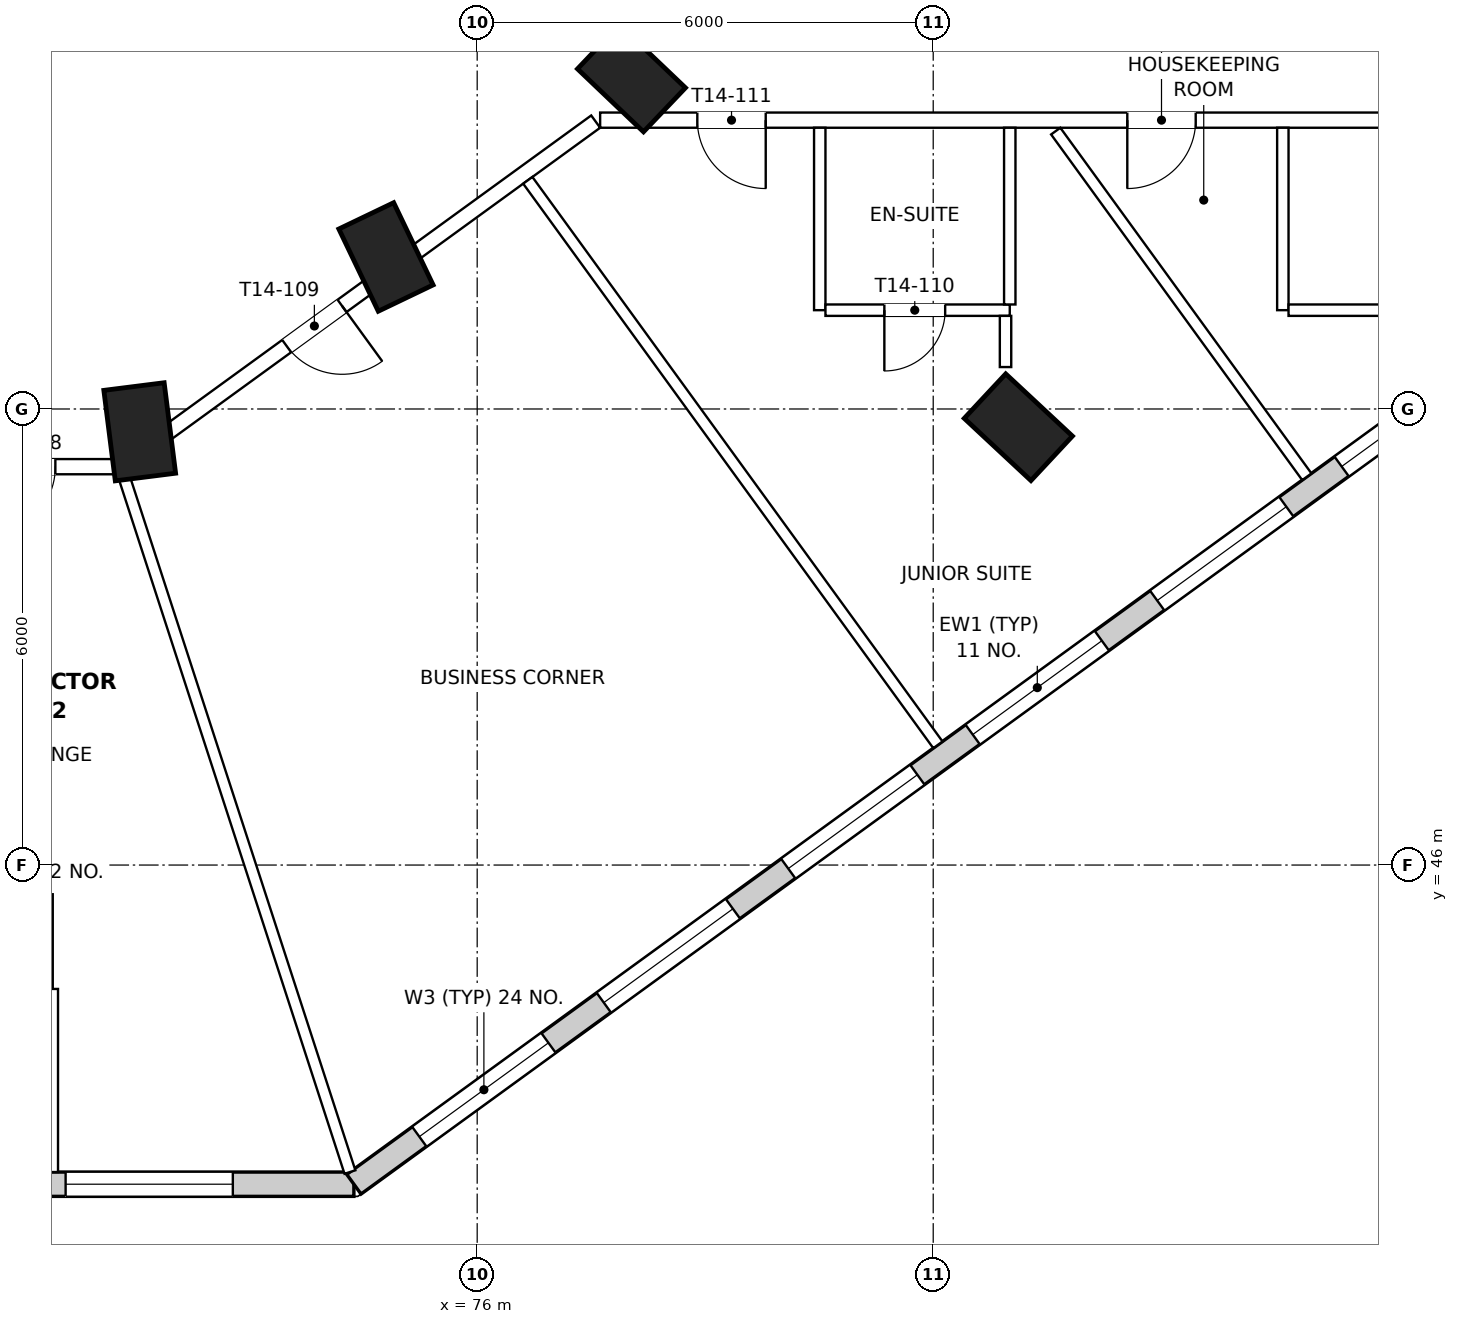
"""IFC4 building model, lengths in metres.
Left out: names, types, materials, properties, quantities, classifications, styles, units other than length and angle.
Written with IfcOpenShell. Run it as: python <this file> out.ifc"""

import sys

from ifc_helpers import new_model, si_unit, direction, frame, frame_2d, origin, origin_2d, place, context, subcontext, project, spatial, rectangle, extrude, element, fill, save


model = new_model("IFC4")
c1 = context("Model", 3, precision=1e-05, world=origin(), true_north=direction((0.0, 1.0)))
c2 = subcontext(c1, "Body", "Model", "MODEL_VIEW")
j1 = project(units=[si_unit("LENGTHUNIT", "METRE"), si_unit("PLANEANGLEUNIT", "RADIAN")], contexts=[c1])
p1 = place(None, origin())
s1 = spatial("IfcSite", under=j1, at=p1, CompositionType="ELEMENT")
p2 = place(p1, origin())
s2 = spatial("IfcBuilding", under=s1, at=p2, CompositionType="ELEMENT")
p3 = place(p2, frame((0.0, 0.0, 204.3)))
s3 = spatial("IfcBuildingStorey", under=s2, at=p3, CompositionType="ELEMENT", Elevation=204.3)
for number, where, z_axis, x_axis in (
    (1, (83.12, 51.76, 0.0), (0.0, 0.0, 1.0), (-0.682, -0.731, 0.0)),
    (2, (71.56, 51.7, 0.0), (0.0, 0.0, 1.0), (-0.992, -0.126, 0.0)),
    (3, (74.8, 54.0, 0.0), (0.0, 0.0, 1.0), (-0.902, -0.432, 0.0)),
    (4, (78.03, 56.35, 0.0), (0.0, 0.0, 1.0), (-0.69, -0.724, 0.0)),
):
    element("IfcColumn", number, at=place(p3, frame(where, z_axis=z_axis, x_axis=x_axis)), inside=s3, PredefinedType="COLUMN", context=c2, shape_type="SweptSolid", body=[
        extrude(rectangle(XDim=0.8, YDim=1.2, at=origin_2d()), origin(), (0.0, 0.0, 1.0), 3.9),
    ])
p4 = place(p3, frame((65.622, 41.801, 0.0), z_axis=(0.0, 0.0, 1.0), x_axis=(1.0, 0.0, 0.0)))
e5 = element("IfcWall", 5, at=p4, inside=s3, PredefinedType="SOLIDWALL", context=c2, shape_type="SweptSolid", body=[
    extrude(rectangle(XDim=8.755, YDim=0.32, at=frame_2d((4.378, 0.0))), origin(), (0.0, 0.0, 1.0), 3.6),
])
p5 = place(p4, frame((1.778, 0.0, 0.75)))
e6 = element("IfcOpeningElement", 6, at=p5, cuts=e5, PredefinedType="OPENING", context=c2, shape_type="SweptSolid", body=[
    extrude(rectangle(XDim=2.2, YDim=2.1, at=frame_2d((1.1, 1.05))), frame((0.0, 0.17, 0.0), z_axis=(0.0, -1.0, 0.0), x_axis=(1.0, 0.0, 0.0)), (0.0, 0.0, 1.0), 0.34),
])
p6 = place(p4, frame((4.963, 0.0, 0.75)))
e7 = element("IfcOpeningElement", 7, at=p6, cuts=e5, PredefinedType="OPENING", context=c2, shape_type="SweptSolid", body=[
    extrude(rectangle(XDim=2.2, YDim=2.1, at=frame_2d((1.1, 1.05))), frame((0.0, 0.17, 0.0), z_axis=(0.0, -1.0, 0.0), x_axis=(1.0, 0.0, 0.0)), (0.0, 0.0, 1.0), 0.34),
])
p7 = place(p3, frame((74.378, 41.801, 0.0), z_axis=(0.0, 0.0, 1.0), x_axis=(0.809017634756, 0.587784370883, 0.0)))
e8 = element("IfcWall", 8, at=p7, inside=s3, PredefinedType="SOLIDWALL", context=c2, shape_type="SweptSolid", body=[
    extrude(rectangle(XDim=22.229, YDim=0.32, at=frame_2d((11.114, 0.0))), origin(), (0.0, 0.0, 1.0), 3.6),
])
p8 = place(p7, frame((1.064, 0.0, 0.75)))
e9 = element("IfcOpeningElement", 9, at=p8, cuts=e8, PredefinedType="OPENING", context=c2, shape_type="SweptSolid", body=[
    extrude(rectangle(XDim=2.1, YDim=2.1, at=frame_2d((1.05, 1.05))), frame((0.0, 0.17, 0.0), z_axis=(0.0, -1.0, 0.0), x_axis=(1.0, 0.0, 0.0)), (0.0, 0.0, 1.0), 0.34),
])
p9 = place(p7, frame((4.064, 0.0, 0.75)))
e10 = element("IfcOpeningElement", 10, at=p9, cuts=e8, PredefinedType="OPENING", context=c2, shape_type="SweptSolid", body=[
    extrude(rectangle(XDim=2.1, YDim=2.1, at=frame_2d((1.05, 1.05))), frame((0.0, 0.17, 0.0), z_axis=(0.0, -1.0, 0.0), x_axis=(1.0, 0.0, 0.0)), (0.0, 0.0, 1.0), 0.34),
])
p10 = place(p7, frame((7.064, 0.0, 0.75)))
e11 = element("IfcOpeningElement", 11, at=p10, cuts=e8, PredefinedType="OPENING", context=c2, shape_type="SweptSolid", body=[
    extrude(rectangle(XDim=2.1, YDim=2.1, at=frame_2d((1.05, 1.05))), frame((0.0, 0.17, 0.0), z_axis=(0.0, -1.0, 0.0), x_axis=(1.0, 0.0, 0.0)), (0.0, 0.0, 1.0), 0.34),
])
p11 = place(p7, frame((10.064, 0.0, 0.75)))
e12 = element("IfcOpeningElement", 12, at=p11, cuts=e8, PredefinedType="OPENING", context=c2, shape_type="SweptSolid", body=[
    extrude(rectangle(XDim=2.1, YDim=2.1, at=frame_2d((1.05, 1.05))), frame((0.0, 0.17, 0.0), z_axis=(0.0, -1.0, 0.0), x_axis=(1.0, 0.0, 0.0)), (0.0, 0.0, 1.0), 0.34),
])
p12 = place(p7, frame((13.064, 0.0, 0.75)))
e13 = element("IfcOpeningElement", 13, at=p12, cuts=e8, PredefinedType="OPENING", context=c2, shape_type="SweptSolid", body=[
    extrude(rectangle(XDim=2.1, YDim=2.1, at=frame_2d((1.05, 1.05))), frame((0.0, 0.17, 0.0), z_axis=(0.0, -1.0, 0.0), x_axis=(1.0, 0.0, 0.0)), (0.0, 0.0, 1.0), 0.34),
])
p13 = place(p7, frame((16.064, 0.0, 0.75)))
e14 = element("IfcOpeningElement", 14, at=p13, cuts=e8, PredefinedType="OPENING", context=c2, shape_type="SweptSolid", body=[
    extrude(rectangle(XDim=2.1, YDim=2.1, at=frame_2d((1.05, 1.05))), frame((0.0, 0.17, 0.0), z_axis=(0.0, -1.0, 0.0), x_axis=(1.0, 0.0, 0.0)), (0.0, 0.0, 1.0), 0.34),
])
p14 = place(p7, frame((19.064, 0.0, 0.75)))
e15 = element("IfcOpeningElement", 15, at=p14, cuts=e8, PredefinedType="OPENING", context=c2, shape_type="SweptSolid", body=[
    extrude(rectangle(XDim=2.1, YDim=2.1, at=frame_2d((1.05, 1.05))), frame((0.0, 0.17, 0.0), z_axis=(0.0, -1.0, 0.0), x_axis=(1.0, 0.0, 0.0)), (0.0, 0.0, 1.0), 0.34),
])
p15 = place(p3, frame((89.0, 55.8, 0.0), z_axis=(0.0, 0.0, 1.0), x_axis=(-1.0, 0.0, 0.0)))
e16 = element("IfcWall", 16, at=p15, inside=s3, PredefinedType="PARTITIONING", context=c2, shape_type="SweptSolid", body=[
    extrude(rectangle(XDim=11.382, YDim=0.2, at=frame_2d((5.691, 0.0))), origin(), (0.0, 0.0, 1.0), 2.9),
])
p16 = place(p15, frame((9.204, 0.0, 0.0)))
e17 = element("IfcOpeningElement", 17, at=p16, cuts=e16, PredefinedType="OPENING", context=c2, shape_type="SweptSolid", body=[
    extrude(rectangle(XDim=0.9, YDim=2.1, at=frame_2d((0.45, 1.05))), frame((0.0, 0.11, 0.0), z_axis=(0.0, -1.0, 0.0), x_axis=(1.0, 0.0, 0.0)), (0.0, 0.0, 1.0), 0.22),
])
p17 = place(p15, frame((3.546, 0.0, 0.0)))
e18 = element("IfcOpeningElement", 18, at=p17, cuts=e16, PredefinedType="OPENING", context=c2, shape_type="SweptSolid", body=[
    extrude(rectangle(XDim=0.9, YDim=2.1, at=frame_2d((0.45, 1.05))), frame((0.0, 0.11, 0.0), z_axis=(0.0, -1.0, 0.0), x_axis=(1.0, 0.0, 0.0)), (0.0, 0.0, 1.0), 0.22),
])
p18 = place(p3, frame((77.559, 55.781, 0.0), z_axis=(0.0, 0.0, 1.0), x_axis=(-0.80901190539, -0.587792256616, 0.0)))
e19 = element("IfcWall", 19, at=p18, inside=s3, PredefinedType="PARTITIONING", context=c2, shape_type="SweptSolid", body=[
    extrude(rectangle(XDim=7.691, YDim=0.2, at=frame_2d((3.846, 0.0))), origin(), (0.0, 0.0, 1.0), 3.05),
])
p19 = place(p18, frame((4.125, 0.0, 0.0)))
e20 = element("IfcOpeningElement", 20, at=p19, cuts=e19, PredefinedType="OPENING", context=c2, shape_type="SweptSolid", body=[
    extrude(rectangle(XDim=0.9, YDim=2.1, at=frame_2d((0.45, 1.05))), frame((0.0, 0.11, 0.0), z_axis=(0.0, -1.0, 0.0), x_axis=(1.0, 0.0, 0.0)), (0.0, 0.0, 1.0), 0.22),
])
p20 = place(p3, frame((71.278, 51.241, 0.0), z_axis=(0.0, 0.0, 1.0), x_axis=(-1.0, 0.0, 0.0)))
e21 = element("IfcWall", 21, at=p20, inside=s3, PredefinedType="PARTITIONING", context=c2, shape_type="SweptSolid", body=[
    extrude(rectangle(XDim=2.556, YDim=0.2, at=frame_2d((1.278, 0.0))), origin(), (0.0, 0.0, 1.0), 3.6),
])
p21 = place(p20, frame((0.828, 0.0, 0.0)))
e22 = element("IfcOpeningElement", 22, at=p21, cuts=e21, PredefinedType="OPENING", context=c2, shape_type="SweptSolid", body=[
    extrude(rectangle(XDim=0.9, YDim=2.1, at=frame_2d((0.45, 1.05))), frame((0.0, 0.11, 0.0), z_axis=(0.0, -1.0, 0.0), x_axis=(1.0, 0.0, 0.0)), (0.0, 0.0, 1.0), 0.22),
])
p22 = place(p3, frame((74.326, 41.961, 0.0), z_axis=(0.0, 0.0, 1.0), x_axis=(-0.309002171774, 0.951061332322, 0.0)))
e23 = element("IfcWall", 23, at=p22, inside=s3, PredefinedType="PARTITIONING", context=c2, shape_type="SweptSolid", body=[
    extrude(rectangle(XDim=9.672, YDim=0.15, at=frame_2d((4.836, 0.0))), origin(), (0.0, 0.0, 1.0), 3.6),
])
p23 = place(p3, frame((82.062, 47.582, 0.0), z_axis=(0.0, 0.0, 1.0), x_axis=(-0.587777877013, 0.809022352778, 0.0)))
e24 = element("IfcWall", 24, at=p23, inside=s3, PredefinedType="PARTITIONING", context=c2, shape_type="SweptSolid", body=[
    extrude(rectangle(XDim=9.18, YDim=0.15, at=frame_2d((4.59, 0.0))), origin(), (0.0, 0.0, 1.0), 3.6),
])
p24 = place(p3, frame((86.916, 51.108, 0.0), z_axis=(0.0, 0.0, 1.0), x_axis=(-0.587804932614, 0.809002695419, 0.0)))
e25 = element("IfcWall", 25, at=p24, inside=s3, PredefinedType="PARTITIONING", context=c2, shape_type="SweptSolid", body=[
    extrude(rectangle(XDim=5.621, YDim=0.15, at=frame_2d((2.811, 0.0))), origin(), (0.0, 0.0, 1.0), 2.9),
])
p25 = place(p3, frame((80.507, 55.7, 0.0), z_axis=(0.0, 0.0, 1.0), x_axis=(0.0, -1.0, 0.0)))
e26 = element("IfcWall", 26, at=p25, inside=s3, PredefinedType="PARTITIONING", context=c2, shape_type="SweptSolid", body=[
    extrude(rectangle(XDim=2.4, YDim=0.15, at=frame_2d((1.2, 0.0))), origin(), (0.0, 0.0, 1.0), 3.6),
])
p26 = place(p3, frame((83.007, 53.3, 0.0), z_axis=(0.0, 0.0, 1.0), x_axis=(-1.0, 0.0, 0.0)))
e27 = element("IfcWall", 27, at=p26, inside=s3, PredefinedType="PARTITIONING", context=c2, shape_type="SweptSolid", body=[
    extrude(rectangle(XDim=2.425, YDim=0.15, at=frame_2d((1.212, 0.0))), origin(), (0.0, 0.0, 1.0), 3.15),
])
p27 = place(p26, frame((0.85, 0.0, 0.0)))
e28 = element("IfcOpeningElement", 28, at=p27, cuts=e27, PredefinedType="OPENING", context=c2, shape_type="SweptSolid", body=[
    extrude(rectangle(XDim=0.8, YDim=2.1, at=frame_2d((0.4, 1.05))), frame((0.0, 0.085, 0.0), z_axis=(0.0, -1.0, 0.0), x_axis=(1.0, 0.0, 0.0)), (0.0, 0.0, 1.0), 0.17),
])
p28 = place(p3, frame((83.007, 55.7, 0.0), z_axis=(0.0, 0.0, 1.0), x_axis=(0.0, -1.0, 0.0)))
e29 = element("IfcWall", 29, at=p28, inside=s3, PredefinedType="PARTITIONING", context=c2, shape_type="SweptSolid", body=[
    extrude(rectangle(XDim=2.325, YDim=0.15, at=frame_2d((1.163, 0.0))), origin(), (0.0, 0.0, 1.0), 3.15),
])
p29 = place(p3, frame((86.6, 55.7, 0.0), z_axis=(0.0, 0.0, 1.0), x_axis=(0.0, -1.0, 0.0)))
e30 = element("IfcWall", 30, at=p29, inside=s3, PredefinedType="PARTITIONING", context=c2, shape_type="SweptSolid", body=[
    extrude(rectangle(XDim=2.4, YDim=0.15, at=frame_2d((1.2, 0.0))), origin(), (0.0, 0.0, 1.0), 2.9),
])
p30 = place(p3, frame((89.933, 53.3, 0.0), z_axis=(0.0, 0.0, 1.0), x_axis=(-1.0, 0.0, 0.0)))
e31 = element("IfcWall", 31, at=p30, inside=s3, PredefinedType="PARTITIONING", context=c2, shape_type="SweptSolid", body=[
    extrude(rectangle(XDim=3.258, YDim=0.15, at=frame_2d((1.629, 0.0))), origin(), (0.0, 0.0, 1.0), 3.6),
])
p31 = place(p3, frame((70.41, 44.37, 0.0), z_axis=(0.0, 0.0, 1.0), x_axis=(0.0, -1.0, 0.0)))
e32 = element("IfcWall", 32, at=p31, inside=s3, PredefinedType="PARTITIONING", context=c2, shape_type="SweptSolid", body=[
    extrude(rectangle(XDim=2.409, YDim=0.15, at=frame_2d((1.205, 0.0))), origin(), (0.0, 0.0, 1.0), 3.6),
])
p32 = place(p3, frame((82.951, 52.552, 0.0), z_axis=(0.0, 0.0, 1.0), x_axis=(0.0, 1.0, 0.0)))
e33 = element("IfcWall", 33, at=p32, inside=s3, PredefinedType="PARTITIONING", context=c2, shape_type="SweptSolid", body=[
    extrude(rectangle(XDim=0.673, YDim=0.15, at=frame_2d((0.337, 0.0))), origin(), (0.0, 0.0, 1.0), 3.15),
])
p33 = place(p6, origin())
e34 = element("IfcWindow", 34, at=p33, inside=s3, PartitioningType="SINGLE_PANEL", PredefinedType="WINDOW", context=c2, shape_type="SweptSolid", body=[
    extrude(rectangle(XDim=2.2, YDim=2.1, at=frame_2d((1.1, 1.05))), frame((0.0, 0.07, 0.0), z_axis=(0.0, -1.0, 0.0), x_axis=(1.0, 0.0, 0.0)), (0.0, 0.0, 1.0), 0.06),
])
fill(e7, e34)
p34 = place(p8, origin())
e35 = element("IfcWindow", 35, at=p34, inside=s3, PartitioningType="SINGLE_PANEL", PredefinedType="WINDOW", context=c2, shape_type="SweptSolid", body=[
    extrude(rectangle(XDim=2.1, YDim=2.1, at=frame_2d((1.05, 1.05))), frame((0.0, 0.07, 0.0), z_axis=(0.0, -1.0, 0.0), x_axis=(1.0, 0.0, 0.0)), (0.0, 0.0, 1.0), 0.06),
])
fill(e9, e35)
p35 = place(p9, origin())
e36 = element("IfcWindow", 36, at=p35, inside=s3, PartitioningType="SINGLE_PANEL", PredefinedType="WINDOW", context=c2, shape_type="SweptSolid", body=[
    extrude(rectangle(XDim=2.1, YDim=2.1, at=frame_2d((1.05, 1.05))), frame((0.0, 0.07, 0.0), z_axis=(0.0, -1.0, 0.0), x_axis=(1.0, 0.0, 0.0)), (0.0, 0.0, 1.0), 0.06),
])
fill(e10, e36)
p36 = place(p10, origin())
e37 = element("IfcWindow", 37, at=p36, inside=s3, PartitioningType="SINGLE_PANEL", PredefinedType="WINDOW", context=c2, shape_type="SweptSolid", body=[
    extrude(rectangle(XDim=2.1, YDim=2.1, at=frame_2d((1.05, 1.05))), frame((0.0, 0.07, 0.0), z_axis=(0.0, -1.0, 0.0), x_axis=(1.0, 0.0, 0.0)), (0.0, 0.0, 1.0), 0.06),
])
fill(e11, e37)
p37 = place(p11, origin())
e38 = element("IfcWindow", 38, at=p37, inside=s3, PartitioningType="SINGLE_PANEL", PredefinedType="WINDOW", context=c2, shape_type="SweptSolid", body=[
    extrude(rectangle(XDim=2.1, YDim=2.1, at=frame_2d((1.05, 1.05))), frame((0.0, 0.07, 0.0), z_axis=(0.0, -1.0, 0.0), x_axis=(1.0, 0.0, 0.0)), (0.0, 0.0, 1.0), 0.06),
])
fill(e12, e38)
p38 = place(p12, origin())
e39 = element("IfcWindow", 39, at=p38, inside=s3, PartitioningType="SINGLE_PANEL", PredefinedType="WINDOW", context=c2, shape_type="SweptSolid", body=[
    extrude(rectangle(XDim=2.1, YDim=2.1, at=frame_2d((1.05, 1.05))), frame((0.0, 0.07, 0.0), z_axis=(0.0, -1.0, 0.0), x_axis=(1.0, 0.0, 0.0)), (0.0, 0.0, 1.0), 0.06),
])
fill(e13, e39)
p39 = place(p13, origin())
e40 = element("IfcWindow", 40, at=p39, inside=s3, PartitioningType="SINGLE_PANEL", PredefinedType="WINDOW", context=c2, shape_type="SweptSolid", body=[
    extrude(rectangle(XDim=2.1, YDim=2.1, at=frame_2d((1.05, 1.05))), frame((0.0, 0.07, 0.0), z_axis=(0.0, -1.0, 0.0), x_axis=(1.0, 0.0, 0.0)), (0.0, 0.0, 1.0), 0.06),
])
fill(e14, e40)
p40 = place(p21, origin())
e41 = element("IfcDoor", 41, at=p40, inside=s3, OperationType="SINGLE_SWING_RIGHT", PredefinedType="DOOR", context=c2, shape_type="SweptSolid", body=[
    extrude(rectangle(XDim=0.9, YDim=2.1, at=frame_2d((0.45, 1.05))), frame((0.0, 0.025, 0.0), z_axis=(0.0, -1.0, 0.0), x_axis=(1.0, 0.0, 0.0)), (0.0, 0.0, 1.0), 0.05),
])
fill(e22, e41)
p41 = place(p19, origin())
e42 = element("IfcDoor", 42, at=p41, inside=s3, OperationType="SINGLE_SWING_LEFT", PredefinedType="DOOR", context=c2, shape_type="SweptSolid", body=[
    extrude(rectangle(XDim=0.9, YDim=2.1, at=frame_2d((0.45, 1.05))), frame((0.0, 0.025, 0.0), z_axis=(0.0, -1.0, 0.0), x_axis=(1.0, 0.0, 0.0)), (0.0, 0.0, 1.0), 0.05),
])
fill(e20, e42)
p42 = place(p27, origin())
e43 = element("IfcDoor", 43, at=p42, inside=s3, OperationType="SINGLE_SWING_RIGHT", PredefinedType="DOOR", context=c2, shape_type="SweptSolid", body=[
    extrude(rectangle(XDim=0.8, YDim=2.1, at=frame_2d((0.4, 1.05))), frame((0.0, 0.025, 0.0), z_axis=(0.0, -1.0, 0.0), x_axis=(1.0, 0.0, 0.0)), (0.0, 0.0, 1.0), 0.05),
])
fill(e28, e43)
p43 = place(p16, origin())
e44 = element("IfcDoor", 44, at=p43, inside=s3, OperationType="SINGLE_SWING_LEFT", PredefinedType="DOOR", context=c2, shape_type="SweptSolid", body=[
    extrude(rectangle(XDim=0.9, YDim=2.1, at=frame_2d((0.45, 1.05))), frame((0.0, 0.025, 0.0), z_axis=(0.0, -1.0, 0.0), x_axis=(1.0, 0.0, 0.0)), (0.0, 0.0, 1.0), 0.05),
])
fill(e17, e44)
p44 = place(p17, origin())
e45 = element("IfcDoor", 45, at=p44, inside=s3, OperationType="SINGLE_SWING_RIGHT", PredefinedType="DOOR", context=c2, shape_type="SweptSolid", body=[
    extrude(rectangle(XDim=0.9, YDim=2.1, at=frame_2d((0.45, 1.05))), frame((0.0, 0.025, 0.0), z_axis=(0.0, -1.0, 0.0), x_axis=(1.0, 0.0, 0.0)), (0.0, 0.0, 1.0), 0.05),
])
fill(e18, e45)
save(model, sys.argv[1])
